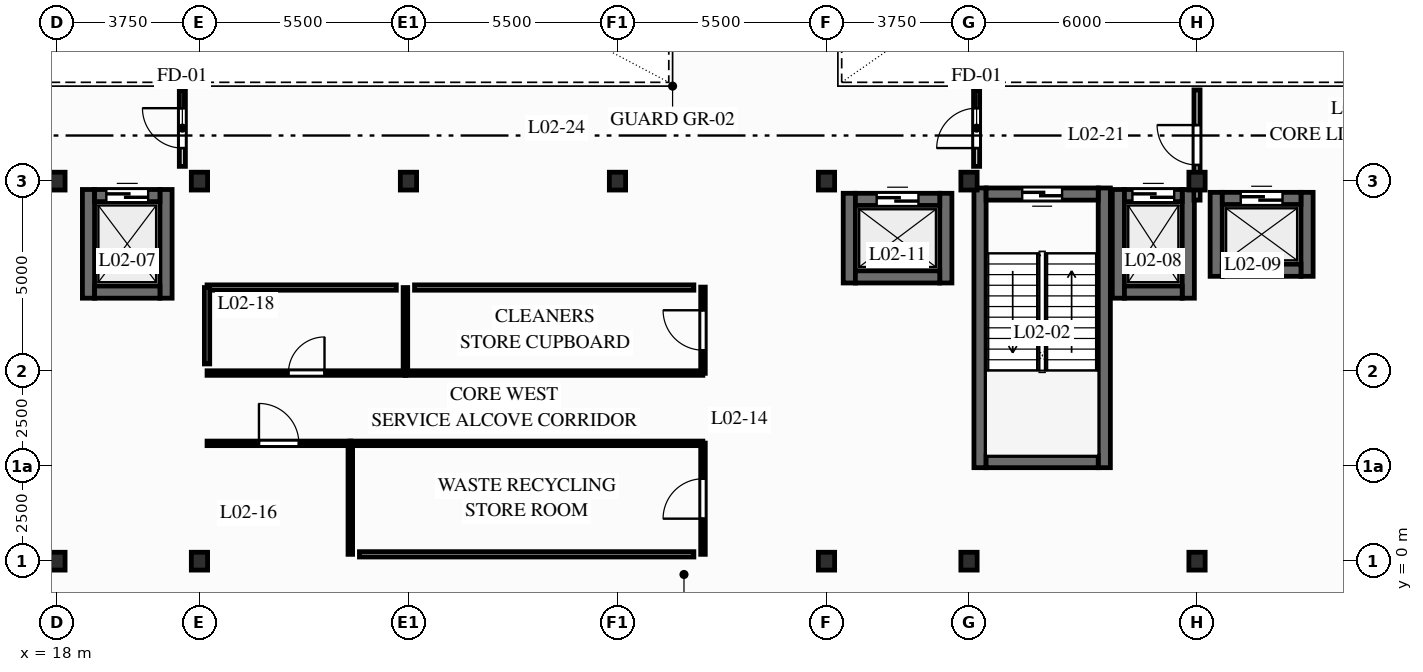
"""IFC4 building model, lengths in metres.
Left out: names, types, materials, properties, quantities, classifications, styles, units other than length and angle.
Written with IfcOpenShell. Run it as: python <this file> out.ifc"""

import sys

from ifc_helpers import new_model, si_unit, direction, frame, frame_2d, origin, origin_2d, place, context, subcontext, project, spatial, rectangle, i_section, extrude, element, fill, save


model = new_model("IFC4")
c1 = context("Model", 3, precision=1e-05, world=origin(), true_north=direction((0.0, 1.0)))
c2 = subcontext(c1, "Body", "Model", "MODEL_VIEW")
j1 = project(units=[si_unit("LENGTHUNIT", "METRE"), si_unit("PLANEANGLEUNIT", "RADIAN")], contexts=[c1])
p1 = place(None, origin())
s1 = spatial("IfcSite", under=j1, at=p1, CompositionType="ELEMENT")
p2 = place(p1, origin())
s2 = spatial("IfcBuilding", under=s1, at=p2, CompositionType="ELEMENT")
p3 = place(p2, frame((0.0, 0.0, 9.0)))
s3 = spatial("IfcBuildingStorey", under=s2, at=p3, CompositionType="ELEMENT", Elevation=9.0)
for number, where, z_axis, x_axis in (
    (1, (18.0, 0.0, 0.0), (0.0, 0.0, 1.0), (1.0, 0.0, 0.0)),
    (2, (18.0, 10.0, 0.0), (0.0, 0.0, 1.0), (1.0, 0.0, 0.0)),
    (3, (21.75, 0.0, 0.0), (0.0, 0.0, 1.0), (1.0, 0.0, 0.0)),
    (4, (21.75, 10.0, 0.0), (0.0, 0.0, 1.0), (1.0, 0.0, 0.0)),
    (5, (27.25, 10.0, 0.0), (0.0, 0.0, 1.0), (1.0, 0.0, 0.0)),
    (6, (32.75, 10.0, 0.0), (0.0, 0.0, 1.0), (1.0, 0.0, 0.0)),
    (7, (38.25, 0.0, 0.0), (0.0, 0.0, 1.0), (1.0, 0.0, 0.0)),
    (8, (38.25, 10.0, 0.0), (0.0, 0.0, 1.0), (1.0, 0.0, 0.0)),
    (9, (42.0, 0.0, 0.0), (0.0, 0.0, 1.0), (1.0, 0.0, 0.0)),
    (10, (42.0, 10.0, 0.0), (0.0, 0.0, 1.0), (1.0, 0.0, 0.0)),
    (11, (48.0, 0.0, 0.0), (0.0, 0.0, 1.0), (1.0, 0.0, 0.0)),
    (12, (48.0, 10.0, 0.0), (0.0, 0.0, 1.0), (1.0, 0.0, 0.0)),
):
    element("IfcColumn", number, at=place(p3, frame(where, z_axis=z_axis, x_axis=x_axis)), inside=s3, PredefinedType="COLUMN", context=c2, shape_type="SweptSolid", body=[
        extrude(i_section(OverallWidth=0.428, OverallDepth=0.469, WebThickness=0.078, FlangeThickness=0.125, FilletRadius=0.015, at=origin_2d()), origin(), (0.0, 0.0, 1.0), 4.5),
    ])
for number, where, z_axis, x_axis in (
    (13, (42.29, 2.46, 0.0), (0.0, 0.0, 1.0), (0.0, 1.0, 0.0)),
    (14, (45.56, 2.46, 0.0), (0.0, 0.0, 1.0), (0.0, 1.0, 0.0)),
):
    element("IfcWall", number, at=place(p3, frame(where, z_axis=z_axis, x_axis=x_axis)), inside=s3, PredefinedType="SHEAR", context=c2, shape_type="SweptSolid", body=[
        extrude(rectangle(XDim=7.36, YDim=0.32, at=frame_2d((3.68, 0.0))), origin(), (0.0, 0.0, 1.0), 4.22),
    ])
p4 = place(p3, frame((42.45, 2.62, 0.0), z_axis=(0.0, 0.0, 1.0), x_axis=(1.0, 0.0, 0.0)))
e15 = element("IfcWall", 15, at=p4, inside=s3, PredefinedType="SHEAR", context=c2, shape_type="SweptSolid", body=[
    extrude(rectangle(XDim=2.95, YDim=0.32, at=frame_2d((1.475, 0.0))), origin(), (0.0, 0.0, 1.0), 4.22),
])
p5 = place(p3, frame((45.4, 9.66, 0.0), z_axis=(0.0, 0.0, 1.0), x_axis=(-1.0, 0.0, 0.0)))
e16 = element("IfcWall", 16, at=p5, inside=s3, PredefinedType="SHEAR", context=c2, shape_type="SweptSolid", body=[
    extrude(rectangle(XDim=2.95, YDim=0.32, at=frame_2d((1.475, 0.0))), origin(), (0.0, 0.0, 1.0), 4.22),
])
p6 = place(p5, frame((0.95, 0.0, 0.0)))
e17 = element("IfcOpeningElement", 17, at=p6, cuts=e16, PredefinedType="OPENING", context=c2, shape_type="SweptSolid", body=[
    extrude(rectangle(XDim=1.05, YDim=2.06, at=frame_2d((0.525, 1.03))), frame((0.0, 0.17, 0.0), z_axis=(0.0, -1.0, 0.0), x_axis=(1.0, 0.0, 0.0)), (0.0, 0.0, 1.0), 0.34),
])
for number, where, z_axis, x_axis in (
    (18, (18.83, 6.92, 0.0), (0.0, 0.0, 1.0), (0.0, 1.0, 0.0)),
    (19, (20.87, 6.92, 0.0), (0.0, 0.0, 1.0), (0.0, 1.0, 0.0)),
):
    element("IfcWall", number, at=place(p3, frame(where, z_axis=z_axis, x_axis=x_axis)), inside=s3, PredefinedType="SHEAR", context=c2, shape_type="SweptSolid", body=[
        extrude(rectangle(XDim=2.86, YDim=0.32, at=frame_2d((1.43, 0.0))), origin(), (0.0, 0.0, 1.0), 4.22),
    ])
p7 = place(p3, frame((18.99, 7.08, 0.0), z_axis=(0.0, 0.0, 1.0), x_axis=(1.0, 0.0, 0.0)))
e20 = element("IfcWall", 20, at=p7, inside=s3, PredefinedType="SHEAR", context=c2, shape_type="SweptSolid", body=[
    extrude(rectangle(XDim=1.72, YDim=0.32, at=frame_2d((0.86, 0.0))), origin(), (0.0, 0.0, 1.0), 4.22),
])
p8 = place(p3, frame((18.99, 9.62, 0.0), z_axis=(0.0, 0.0, 1.0), x_axis=(1.0, 0.0, 0.0)))
e21 = element("IfcWall", 21, at=p8, inside=s3, PredefinedType="SHEAR", context=c2, shape_type="SweptSolid", body=[
    extrude(rectangle(XDim=1.72, YDim=0.32, at=frame_2d((0.86, 0.0))), origin(), (0.0, 0.0, 1.0), 4.22),
])
p9 = place(p8, frame((0.31, 0.0, 0.0)))
e22 = element("IfcOpeningElement", 22, at=p9, cuts=e21, PredefinedType="OPENING", context=c2, shape_type="SweptSolid", body=[
    extrude(rectangle(XDim=1.1, YDim=2.06, at=frame_2d((0.55, 1.03))), frame((0.0, 0.17, 0.0), z_axis=(0.0, -1.0, 0.0), x_axis=(1.0, 0.0, 0.0)), (0.0, 0.0, 1.0), 0.34),
])
for number, where, z_axis, x_axis in (
    (23, (45.93, 6.92, 0.0), (0.0, 0.0, 1.0), (0.0, 1.0, 0.0)),
    (24, (47.77, 6.92, 0.0), (0.0, 0.0, 1.0), (0.0, 1.0, 0.0)),
):
    element("IfcWall", number, at=place(p3, frame(where, z_axis=z_axis, x_axis=x_axis)), inside=s3, PredefinedType="SHEAR", context=c2, shape_type="SweptSolid", body=[
        extrude(rectangle(XDim=2.86, YDim=0.32, at=frame_2d((1.43, 0.0))), origin(), (0.0, 0.0, 1.0), 4.22),
    ])
p10 = place(p3, frame((46.09, 7.08, 0.0), z_axis=(0.0, 0.0, 1.0), x_axis=(1.0, 0.0, 0.0)))
e25 = element("IfcWall", 25, at=p10, inside=s3, PredefinedType="SHEAR", context=c2, shape_type="SweptSolid", body=[
    extrude(rectangle(XDim=1.52, YDim=0.32, at=frame_2d((0.76, 0.0))), origin(), (0.0, 0.0, 1.0), 4.22),
])
p11 = place(p3, frame((46.09, 9.62, 0.0), z_axis=(0.0, 0.0, 1.0), x_axis=(1.0, 0.0, 0.0)))
e26 = element("IfcWall", 26, at=p11, inside=s3, PredefinedType="SHEAR", context=c2, shape_type="SweptSolid", body=[
    extrude(rectangle(XDim=1.52, YDim=0.32, at=frame_2d((0.76, 0.0))), origin(), (0.0, 0.0, 1.0), 4.22),
])
p12 = place(p11, frame((0.21, 0.0, 0.0)))
e27 = element("IfcOpeningElement", 27, at=p12, cuts=e26, PredefinedType="OPENING", context=c2, shape_type="SweptSolid", body=[
    extrude(rectangle(XDim=1.1, YDim=2.06, at=frame_2d((0.55, 1.03))), frame((0.0, 0.17, 0.0), z_axis=(0.0, -1.0, 0.0), x_axis=(1.0, 0.0, 0.0)), (0.0, 0.0, 1.0), 0.34),
])
for number, where, z_axis, x_axis in (
    (28, (48.505, 7.495, 0.0), (0.0, 0.0, 1.0), (0.0, 1.0, 0.0)),
    (29, (50.895, 7.495, 0.0), (0.0, 0.0, 1.0), (0.0, 1.0, 0.0)),
):
    element("IfcWall", number, at=place(p3, frame(where, z_axis=z_axis, x_axis=x_axis)), inside=s3, PredefinedType="SHEAR", context=c2, shape_type="SweptSolid", body=[
        extrude(rectangle(XDim=2.21, YDim=0.32, at=frame_2d((1.105, 0.0))), origin(), (0.0, 0.0, 1.0), 4.22),
    ])
p13 = place(p3, frame((48.665, 7.655, 0.0), z_axis=(0.0, 0.0, 1.0), x_axis=(1.0, 0.0, 0.0)))
e30 = element("IfcWall", 30, at=p13, inside=s3, PredefinedType="SHEAR", context=c2, shape_type="SweptSolid", body=[
    extrude(rectangle(XDim=2.07, YDim=0.32, at=frame_2d((1.035, 0.0))), origin(), (0.0, 0.0, 1.0), 4.22),
])
p14 = place(p3, frame((48.665, 9.545, 0.0), z_axis=(0.0, 0.0, 1.0), x_axis=(1.0, 0.0, 0.0)))
e31 = element("IfcWall", 31, at=p14, inside=s3, PredefinedType="SHEAR", context=c2, shape_type="SweptSolid", body=[
    extrude(rectangle(XDim=2.07, YDim=0.32, at=frame_2d((1.035, 0.0))), origin(), (0.0, 0.0, 1.0), 4.22),
])
p15 = place(p14, frame((0.485, 0.0, 0.0)))
e32 = element("IfcOpeningElement", 32, at=p15, cuts=e31, PredefinedType="OPENING", context=c2, shape_type="SweptSolid", body=[
    extrude(rectangle(XDim=1.1, YDim=2.06, at=frame_2d((0.55, 1.03))), frame((0.0, 0.17, 0.0), z_axis=(0.0, -1.0, 0.0), x_axis=(1.0, 0.0, 0.0)), (0.0, 0.0, 1.0), 0.34),
])
for number, where, z_axis, x_axis in (
    (33, (38.85, 7.32, 0.0), (0.0, 0.0, 1.0), (0.0, 1.0, 0.0)),
    (34, (41.39, 7.32, 0.0), (0.0, 0.0, 1.0), (0.0, 1.0, 0.0)),
):
    element("IfcWall", number, at=place(p3, frame(where, z_axis=z_axis, x_axis=x_axis)), inside=s3, PredefinedType="SHEAR", context=c2, shape_type="SweptSolid", body=[
        extrude(rectangle(XDim=2.36, YDim=0.32, at=frame_2d((1.18, 0.0))), origin(), (0.0, 0.0, 1.0), 4.22),
    ])
p16 = place(p3, frame((39.01, 7.48, 0.0), z_axis=(0.0, 0.0, 1.0), x_axis=(1.0, 0.0, 0.0)))
e35 = element("IfcWall", 35, at=p16, inside=s3, PredefinedType="SHEAR", context=c2, shape_type="SweptSolid", body=[
    extrude(rectangle(XDim=2.22, YDim=0.32, at=frame_2d((1.11, 0.0))), origin(), (0.0, 0.0, 1.0), 4.22),
])
p17 = place(p3, frame((39.01, 9.52, 0.0), z_axis=(0.0, 0.0, 1.0), x_axis=(1.0, 0.0, 0.0)))
e36 = element("IfcWall", 36, at=p17, inside=s3, PredefinedType="SHEAR", context=c2, shape_type="SweptSolid", body=[
    extrude(rectangle(XDim=2.22, YDim=0.32, at=frame_2d((1.11, 0.0))), origin(), (0.0, 0.0, 1.0), 4.22),
])
p18 = place(p17, frame((0.56, 0.0, 0.0)))
e37 = element("IfcOpeningElement", 37, at=p18, cuts=e36, PredefinedType="OPENING", context=c2, shape_type="SweptSolid", body=[
    extrude(rectangle(XDim=1.1, YDim=2.06, at=frame_2d((0.55, 1.03))), frame((0.0, 0.17, 0.0), z_axis=(0.0, -1.0, 0.0), x_axis=(1.0, 0.0, 0.0)), (0.0, 0.0, 1.0), 0.34),
])
p19 = place(p3, frame((35.0, 0.18, 0.0), z_axis=(0.0, 0.0, 1.0), x_axis=(0.0, 1.0, 0.0)))
e38 = element("IfcWall", 38, at=p19, inside=s3, PredefinedType="PARTITIONING", context=c2, shape_type="SweptSolid", body=[
    extrude(rectangle(XDim=2.927, YDim=0.12, at=frame_2d((1.464, 0.0))), origin(), (0.0, 0.0, 1.0), 4.22),
])
p20 = place(p19, frame((0.939, 0.0, 0.0)))
e39 = element("IfcOpeningElement", 39, at=p20, cuts=e38, PredefinedType="OPENING", context=c2, shape_type="SweptSolid", body=[
    extrude(rectangle(XDim=1.05, YDim=2.06, at=frame_2d((0.525, 1.03))), frame((0.0, 0.07, 0.0), z_axis=(0.0, -1.0, 0.0), x_axis=(1.0, 0.0, 0.0)), (0.0, 0.0, 1.0), 0.14),
])
p21 = place(p3, frame((35.0, 4.943, 0.0), z_axis=(0.0, 0.0, 1.0), x_axis=(0.0, 1.0, 0.0)))
e40 = element("IfcWall", 40, at=p21, inside=s3, PredefinedType="PARTITIONING", context=c2, shape_type="SweptSolid", body=[
    extrude(rectangle(XDim=2.269, YDim=0.12, at=frame_2d((1.134, 0.0))), origin(), (0.0, 0.0, 1.0), 3.738),
])
p22 = place(p21, frame((0.609, 0.0, 0.0)))
e41 = element("IfcOpeningElement", 41, at=p22, cuts=e40, PredefinedType="OPENING", context=c2, shape_type="SweptSolid", body=[
    extrude(rectangle(XDim=1.05, YDim=2.06, at=frame_2d((0.525, 1.03))), frame((0.0, 0.07, 0.0), z_axis=(0.0, -1.0, 0.0), x_axis=(1.0, 0.0, 0.0)), (0.0, 0.0, 1.0), 0.14),
])
p23 = place(p3, frame((21.95, 3.1, 0.0), z_axis=(0.0, 0.0, 1.0), x_axis=(1.0, 0.0, 0.0)))
e42 = element("IfcWall", 42, at=p23, inside=s3, PredefinedType="PARTITIONING", context=c2, shape_type="SweptSolid", body=[
    extrude(rectangle(XDim=3.781, YDim=0.12, at=frame_2d((1.891, 0.0))), origin(), (0.0, 0.0, 1.0), 4.22),
])
p24 = place(p23, frame((1.366, 0.0, 0.0)))
e43 = element("IfcOpeningElement", 43, at=p24, cuts=e42, PredefinedType="OPENING", context=c2, shape_type="SweptSolid", body=[
    extrude(rectangle(XDim=1.05, YDim=2.06, at=frame_2d((0.525, 1.03))), frame((0.0, 0.07, 0.0), z_axis=(0.0, -1.0, 0.0), x_axis=(1.0, 0.0, 0.0)), (0.0, 0.0, 1.0), 0.14),
])
p25 = place(p3, frame((25.713, 3.1, 0.0), z_axis=(0.0, 0.0, 1.0), x_axis=(1.0, 0.0, 0.0)))
e44 = element("IfcWall", 44, at=p25, inside=s3, PredefinedType="PARTITIONING", context=c2, shape_type="SweptSolid", body=[
    extrude(rectangle(XDim=9.283, YDim=0.12, at=frame_2d((4.642, 0.0))), origin(), (0.0, 0.0, 1.0), 4.22),
])
p26 = place(p3, frame((21.95, 4.95, 0.0), z_axis=(0.0, 0.0, 1.0), x_axis=(1.0, 0.0, 0.0)))
e45 = element("IfcWall", 45, at=p26, inside=s3, PredefinedType="PARTITIONING", context=c2, shape_type="SweptSolid", body=[
    extrude(rectangle(XDim=5.231, YDim=0.12, at=frame_2d((2.616, 0.0))), origin(), (0.0, 0.0, 1.0), 3.738),
])
p27 = place(p26, frame((2.141, 0.0, 0.0)))
e46 = element("IfcOpeningElement", 46, at=p27, cuts=e45, PredefinedType="OPENING", context=c2, shape_type="SweptSolid", body=[
    extrude(rectangle(XDim=0.95, YDim=2.05, at=frame_2d((0.475, 1.025))), frame((0.0, 0.07, 0.0), z_axis=(0.0, -1.0, 0.0), x_axis=(1.0, 0.0, 0.0)), (0.0, 0.0, 1.0), 0.14),
])
p28 = place(p3, frame((27.163, 4.95, 0.0), z_axis=(0.0, 0.0, 1.0), x_axis=(1.0, 0.0, 0.0)))
e47 = element("IfcWall", 47, at=p28, inside=s3, PredefinedType="PARTITIONING", context=c2, shape_type="SweptSolid", body=[
    extrude(rectangle(XDim=7.833, YDim=0.12, at=frame_2d((3.917, 0.0))), origin(), (0.0, 0.0, 1.0), 3.738),
])
p29 = place(p3, frame((25.72, 0.18, 0.0), z_axis=(0.0, 0.0, 1.0), x_axis=(0.0, 1.0, 0.0)))
e48 = element("IfcWall", 48, at=p29, inside=s3, PredefinedType="PARTITIONING", context=c2, shape_type="SweptSolid", body=[
    extrude(rectangle(XDim=2.916, YDim=0.12, at=frame_2d((1.458, 0.0))), origin(), (0.0, 0.0, 1.0), 4.22),
])
p30 = place(p3, frame((27.17, 4.954, 0.0), z_axis=(0.0, 0.0, 1.0), x_axis=(0.0, 1.0, 0.0)))
e49 = element("IfcWall", 49, at=p30, inside=s3, PredefinedType="PARTITIONING", context=c2, shape_type="SweptSolid", body=[
    extrude(rectangle(XDim=2.246, YDim=0.12, at=frame_2d((1.123, 0.0))), origin(), (0.0, 0.0, 1.0), 3.738),
])
p31 = place(p3, frame((21.3, 10.389, 0.0), z_axis=(0.0, 0.0, 1.0), x_axis=(0.0, 1.0, 0.0)))
e50 = element("IfcWall", 50, at=p31, inside=s3, PredefinedType="PARTITIONING", context=c2, shape_type="SweptSolid", body=[
    extrude(rectangle(XDim=2.011, YDim=0.16, at=frame_2d((1.006, 0.0))), origin(), (0.0, 0.0, 1.0), 4.22),
])
p32 = place(p31, frame((0.481, 0.0, 0.0)))
e51 = element("IfcOpeningElement", 51, at=p32, cuts=e50, PredefinedType="OPENING", context=c2, shape_type="SweptSolid", body=[
    extrude(rectangle(XDim=1.05, YDim=2.06, at=frame_2d((0.525, 1.03))), frame((0.0, 0.09, 0.0), z_axis=(0.0, -1.0, 0.0), x_axis=(1.0, 0.0, 0.0)), (0.0, 0.0, 1.0), 0.18),
])
p33 = place(p3, frame((42.2, 10.389, 0.0), z_axis=(0.0, 0.0, 1.0), x_axis=(0.0, 1.0, 0.0)))
e52 = element("IfcWall", 52, at=p33, inside=s3, PredefinedType="PARTITIONING", context=c2, shape_type="SweptSolid", body=[
    extrude(rectangle(XDim=2.011, YDim=0.16, at=frame_2d((1.006, 0.0))), origin(), (0.0, 0.0, 1.0), 3.344),
])
p34 = place(p33, frame((0.481, 0.0, 0.0)))
e53 = element("IfcOpeningElement", 53, at=p34, cuts=e52, PredefinedType="OPENING", context=c2, shape_type="SweptSolid", body=[
    extrude(rectangle(XDim=1.05, YDim=2.06, at=frame_2d((0.525, 1.03))), frame((0.0, 0.09, 0.0), z_axis=(0.0, -1.0, 0.0), x_axis=(1.0, 0.0, 0.0)), (0.0, 0.0, 1.0), 0.18),
])
p35 = place(p3, frame((48.0, 9.5, 0.0), z_axis=(0.0, 0.0, 1.0), x_axis=(0.0, 1.0, 0.0)))
e54 = element("IfcWall", 54, at=p35, inside=s3, PredefinedType="PARTITIONING", context=c2, shape_type="SweptSolid", body=[
    extrude(rectangle(XDim=2.9, YDim=0.16, at=frame_2d((1.45, 0.0))), origin(), (0.0, 0.0, 1.0), 3.344),
])
p36 = place(p35, frame((0.925, 0.0, 0.0)))
e55 = element("IfcOpeningElement", 55, at=p36, cuts=e54, PredefinedType="OPENING", context=c2, shape_type="SweptSolid", body=[
    extrude(rectangle(XDim=1.05, YDim=2.06, at=frame_2d((0.525, 1.03))), frame((0.0, 0.09, 0.0), z_axis=(0.0, -1.0, 0.0), x_axis=(1.0, 0.0, 0.0)), (0.0, 0.0, 1.0), 0.18),
])
p37 = place(p3, frame((25.96, 0.18, 0.0), z_axis=(0.0, 0.0, 1.0), x_axis=(1.0, 0.0, 0.0)))
e56 = element("IfcWall", 56, at=p37, inside=s3, PredefinedType="PARTITIONING", context=c2, shape_type="SweptSolid", body=[
    extrude(rectangle(XDim=8.8, YDim=0.14, at=frame_2d((4.4, 0.0))), origin(), (0.0, 0.0, 1.0), 3.583),
])
p38 = place(p3, frame((21.95, 7.2, 0.0), z_axis=(0.0, 0.0, 1.0), x_axis=(1.0, 0.0, 0.0)))
e57 = element("IfcWall", 57, at=p38, inside=s3, PredefinedType="PARTITIONING", context=c2, shape_type="SweptSolid", body=[
    extrude(rectangle(XDim=4.98, YDim=0.14, at=frame_2d((2.49, 0.0))), origin(), (0.0, 0.0, 1.0), 4.22),
])
p39 = place(p3, frame((21.95, 5.19, 0.0), z_axis=(0.0, 0.0, 1.0), x_axis=(0.0, 1.0, 0.0)))
e58 = element("IfcWall", 58, at=p39, inside=s3, PredefinedType="PARTITIONING", context=c2, shape_type="SweptSolid", body=[
    extrude(rectangle(XDim=2.01, YDim=0.14, at=frame_2d((1.005, 0.0))), origin(), (0.0, 0.0, 1.0), 3.344),
])
p40 = place(p3, frame((27.41, 7.2, 0.0), z_axis=(0.0, 0.0, 1.0), x_axis=(1.0, 0.0, 0.0)))
e59 = element("IfcWall", 59, at=p40, inside=s3, PredefinedType="PARTITIONING", context=c2, shape_type="SweptSolid", body=[
    extrude(rectangle(XDim=7.35, YDim=0.14, at=frame_2d((3.675, 0.0))), origin(), (0.0, 0.0, 1.0), 4.22),
])
p41 = place(p6, origin())
e60 = element("IfcDoor", 60, at=p41, inside=s3, OperationType="SINGLE_SWING_LEFT", PredefinedType="DOOR", context=c2, shape_type="SweptSolid", body=[
    extrude(rectangle(XDim=1.05, YDim=2.06, at=frame_2d((0.525, 1.03))), frame((0.0, 0.025, 0.0), z_axis=(0.0, -1.0, 0.0), x_axis=(1.0, 0.0, 0.0)), (0.0, 0.0, 1.0), 0.05),
])
fill(e17, e60)
p42 = place(p9, origin())
e61 = element("IfcDoor", 61, at=p42, inside=s3, OperationType="SLIDING_TO_RIGHT", PredefinedType="DOOR", context=c2, shape_type="SweptSolid", body=[
    extrude(rectangle(XDim=1.1, YDim=2.06, at=frame_2d((0.55, 1.03))), frame((0.0, 0.025, 0.0), z_axis=(0.0, -1.0, 0.0), x_axis=(1.0, 0.0, 0.0)), (0.0, 0.0, 1.0), 0.05),
])
fill(e22, e61)
p43 = place(p12, origin())
e62 = element("IfcDoor", 62, at=p43, inside=s3, OperationType="SLIDING_TO_LEFT", PredefinedType="DOOR", context=c2, shape_type="SweptSolid", body=[
    extrude(rectangle(XDim=1.1, YDim=2.06, at=frame_2d((0.55, 1.03))), frame((0.0, 0.025, 0.0), z_axis=(0.0, -1.0, 0.0), x_axis=(1.0, 0.0, 0.0)), (0.0, 0.0, 1.0), 0.05),
])
fill(e27, e62)
p44 = place(p15, origin())
e63 = element("IfcDoor", 63, at=p44, inside=s3, OperationType="SLIDING_TO_RIGHT", PredefinedType="DOOR", context=c2, shape_type="SweptSolid", body=[
    extrude(rectangle(XDim=1.1, YDim=2.06, at=frame_2d((0.55, 1.03))), frame((0.0, 0.025, 0.0), z_axis=(0.0, -1.0, 0.0), x_axis=(1.0, 0.0, 0.0)), (0.0, 0.0, 1.0), 0.05),
])
fill(e32, e63)
p45 = place(p18, origin())
e64 = element("IfcDoor", 64, at=p45, inside=s3, OperationType="SLIDING_TO_RIGHT", PredefinedType="DOOR", context=c2, shape_type="SweptSolid", body=[
    extrude(rectangle(XDim=1.1, YDim=2.06, at=frame_2d((0.55, 1.03))), frame((0.0, 0.025, 0.0), z_axis=(0.0, -1.0, 0.0), x_axis=(1.0, 0.0, 0.0)), (0.0, 0.0, 1.0), 0.05),
])
fill(e37, e64)
p46 = place(p20, origin())
e65 = element("IfcDoor", 65, at=p46, inside=s3, OperationType="SINGLE_SWING_LEFT", PredefinedType="DOOR", context=c2, shape_type="SweptSolid", body=[
    extrude(rectangle(XDim=1.05, YDim=2.06, at=frame_2d((0.525, 1.03))), frame((0.0, 0.025, 0.0), z_axis=(0.0, -1.0, 0.0), x_axis=(1.0, 0.0, 0.0)), (0.0, 0.0, 1.0), 0.05),
])
fill(e39, e65)
p47 = place(p22, origin())
e66 = element("IfcDoor", 66, at=p47, inside=s3, OperationType="SINGLE_SWING_RIGHT", PredefinedType="DOOR", context=c2, shape_type="SweptSolid", body=[
    extrude(rectangle(XDim=1.05, YDim=2.06, at=frame_2d((0.525, 1.03))), frame((0.0, 0.025, 0.0), z_axis=(0.0, -1.0, 0.0), x_axis=(1.0, 0.0, 0.0)), (0.0, 0.0, 1.0), 0.05),
])
fill(e41, e66)
p48 = place(p24, origin())
e67 = element("IfcDoor", 67, at=p48, inside=s3, OperationType="SINGLE_SWING_LEFT", PredefinedType="DOOR", context=c2, shape_type="SweptSolid", body=[
    extrude(rectangle(XDim=1.05, YDim=2.06, at=frame_2d((0.525, 1.03))), frame((0.0, 0.025, 0.0), z_axis=(0.0, -1.0, 0.0), x_axis=(1.0, 0.0, 0.0)), (0.0, 0.0, 1.0), 0.05),
])
fill(e43, e67)
p49 = place(p27, origin())
e68 = element("IfcDoor", 68, at=p49, inside=s3, OperationType="SINGLE_SWING_RIGHT", PredefinedType="DOOR", context=c2, shape_type="SweptSolid", body=[
    extrude(rectangle(XDim=0.95, YDim=2.05, at=frame_2d((0.475, 1.025))), frame((0.0, 0.025, 0.0), z_axis=(0.0, -1.0, 0.0), x_axis=(1.0, 0.0, 0.0)), (0.0, 0.0, 1.0), 0.05),
])
fill(e46, e68)
p50 = place(p32, origin())
e69 = element("IfcDoor", 69, at=p50, inside=s3, OperationType="SINGLE_SWING_RIGHT", PredefinedType="DOOR", context=c2, shape_type="SweptSolid", body=[
    extrude(rectangle(XDim=1.05, YDim=2.06, at=frame_2d((0.525, 1.03))), frame((0.0, 0.025, 0.0), z_axis=(0.0, -1.0, 0.0), x_axis=(1.0, 0.0, 0.0)), (0.0, 0.0, 1.0), 0.05),
])
fill(e51, e69)
p51 = place(p34, origin())
e70 = element("IfcDoor", 70, at=p51, inside=s3, OperationType="SINGLE_SWING_LEFT", PredefinedType="DOOR", context=c2, shape_type="SweptSolid", body=[
    extrude(rectangle(XDim=1.05, YDim=2.06, at=frame_2d((0.525, 1.03))), frame((0.0, 0.025, 0.0), z_axis=(0.0, -1.0, 0.0), x_axis=(1.0, 0.0, 0.0)), (0.0, 0.0, 1.0), 0.05),
])
fill(e53, e70)
p52 = place(p36, origin())
e71 = element("IfcDoor", 71, at=p52, inside=s3, OperationType="SINGLE_SWING_RIGHT", PredefinedType="DOOR", context=c2, shape_type="SweptSolid", body=[
    extrude(rectangle(XDim=1.05, YDim=2.06, at=frame_2d((0.525, 1.03))), frame((0.0, 0.025, 0.0), z_axis=(0.0, -1.0, 0.0), x_axis=(1.0, 0.0, 0.0)), (0.0, 0.0, 1.0), 0.05),
])
fill(e55, e71)
save(model, sys.argv[1])
